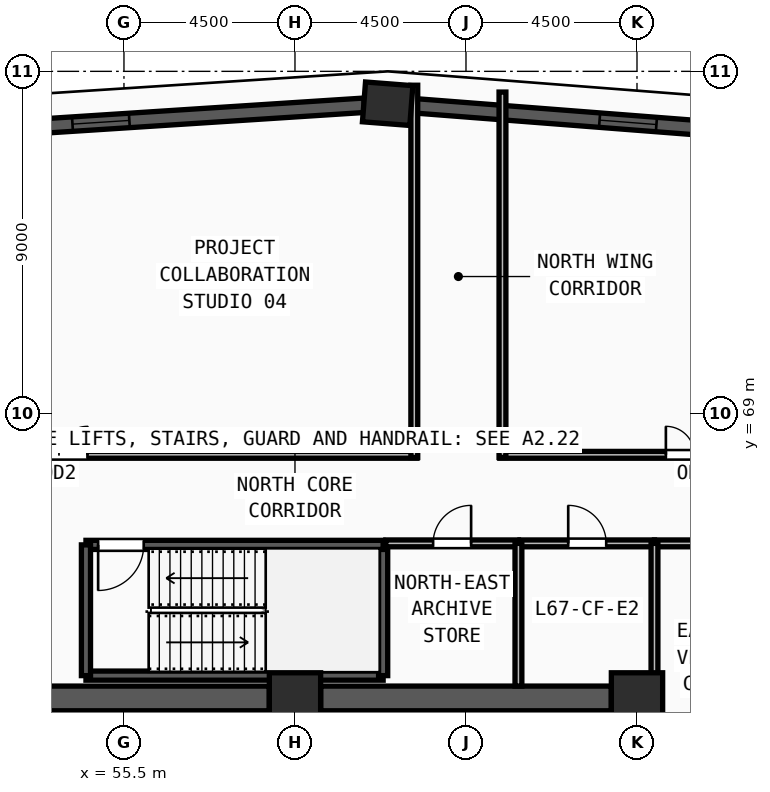
"""IFC4 building model, lengths in metres.
Left out: names, types, materials, properties, quantities, classifications, styles, units other than length and angle.
Written with IfcOpenShell. Run it as: python <this file> out.ifc"""

import sys

from ifc_helpers import new_model, si_unit, direction, frame, frame_2d, origin, origin_2d, place, context, subcontext, project, spatial, rectangle, extrude, source, transform, mapped, element, fill, save


model = new_model("IFC4")
c1 = context("Model", 3, precision=1e-05, world=origin(), true_north=direction((0.0, 1.0)))
c2 = subcontext(c1, "Body", "Model", "MODEL_VIEW")
j1 = project(units=[si_unit("LENGTHUNIT", "METRE"), si_unit("PLANEANGLEUNIT", "RADIAN")], contexts=[c1])
p1 = place(None, origin())
s1 = spatial("IfcSite", under=j1, at=p1, CompositionType="ELEMENT")
p2 = place(p1, origin())
s2 = spatial("IfcBuilding", under=s1, at=p2, CompositionType="ELEMENT")
p3 = place(p2, frame((0.0, 0.0, 258.75)))
s3 = spatial("IfcBuildingStorey", under=s2, at=p3, CompositionType="ELEMENT", Elevation=258.75)
m1 = source(origin(), c2, "Body", "SweptSolid", [
    extrude(rectangle(XDim=1.35, YDim=1.35, at=origin_2d()), origin(), (0.0, 0.0, 1.0), 3.75),
])
for number, where, z_axis, x_axis in (
    (1, (69.0, 61.5, 0.0), (0.0, 0.0, 1.0), (1.0, 0.0, 0.0)),
    (2, (60.0, 61.5, 0.0), (0.0, 0.0, 1.0), (1.0, 0.0, 0.0)),
):
    element("IfcColumn", number, at=place(p3, frame(where, z_axis=z_axis, x_axis=x_axis)), inside=s3, PredefinedType="COLUMN", context=c2, shape_type="MappedRepresentation", body=[
        mapped(m1, transform((0.0, 0.0, 0.0), x_axis=(1.0, 0.0, 0.0), y_axis=(0.0, 1.0, 0.0), z_axis=(0.0, 0.0, 1.0), scale=1.0)),
    ])
m2 = source(origin(), c2, "Body", "SweptSolid", [
    extrude(rectangle(XDim=1.25, YDim=1.05, at=origin_2d()), origin(), (0.0, 0.0, 1.0), 3.75),
])
p4 = place(p3, frame((62.439, 77.148, 0.0), z_axis=(0.0, 0.0, 1.0), x_axis=(-0.997012445566, 0.077241073187, 0.0)))
e3 = element("IfcColumn", 3, at=p4, inside=s3, PredefinedType="COLUMN", context=c2, shape_type="MappedRepresentation", body=[
    mapped(m2, transform((0.0, 0.0, 0.0), x_axis=(1.0, 0.0, 0.0), y_axis=(0.0, 1.0, 0.0), z_axis=(0.0, 0.0, 1.0), scale=1.0)),
])
p5 = place(p3, frame((85.898, 75.331, 0.0), z_axis=(0.0, 0.0, 1.0), x_axis=(-0.997012155609, 0.077244815801, 0.0)))
e4 = element("IfcWall", 4, at=p5, inside=s3, PredefinedType="SOLIDWALL", context=c2, shape_type="SweptSolid", body=[
    extrude(rectangle(XDim=22.914, YDim=0.38, at=frame_2d((11.457, 0.0))), origin(), (0.0, 0.0, 1.0), 3.57),
])
m3 = source(origin(), c2, "Body", "SweptSolid", [
    extrude(rectangle(XDim=1.5, YDim=1.9, at=frame_2d((0.75, 0.95))), frame((0.0, 0.2, 0.0), z_axis=(0.0, -1.0, 0.0), x_axis=(1.0, 0.0, 0.0)), (0.0, 0.0, 1.0), 0.4),
])
p6 = place(p5, frame((4.979, 0.0, 0.55)))
e5 = element("IfcOpeningElement", 5, at=p6, cuts=e4, PredefinedType="OPENING", context=c2, shape_type="MappedRepresentation", body=[
    mapped(m3, transform((0.0, 0.0, 0.0), x_axis=(1.0, 0.0, 0.0), y_axis=(0.0, 1.0, 0.0), z_axis=(0.0, 0.0, 1.0), scale=1.0)),
])
p7 = place(p5, frame((10.707, 0.0, 0.55)))
e6 = element("IfcOpeningElement", 6, at=p7, cuts=e4, PredefinedType="OPENING", context=c2, shape_type="MappedRepresentation", body=[
    mapped(m3, transform((0.0, 0.0, 0.0), x_axis=(1.0, 0.0, 0.0), y_axis=(0.0, 1.0, 0.0), z_axis=(0.0, 0.0, 1.0), scale=1.0)),
])
p8 = place(p5, frame((16.436, 0.0, 0.55)))
e7 = element("IfcOpeningElement", 7, at=p8, cuts=e4, PredefinedType="OPENING", context=c2, shape_type="MappedRepresentation", body=[
    mapped(m3, transform((0.0, 0.0, 0.0), x_axis=(1.0, 0.0, 0.0), y_axis=(0.0, 1.0, 0.0), z_axis=(0.0, 0.0, 1.0), scale=1.0)),
])
p9 = place(p3, frame((61.825, 77.108, 0.0), z_axis=(0.0, 0.0, 1.0), x_axis=(-0.997917689191, -0.064500275963, 0.0)))
e8 = element("IfcWall", 8, at=p9, inside=s3, PredefinedType="SOLIDWALL", context=c2, shape_type="SweptSolid", body=[
    extrude(rectangle(XDim=27.783, YDim=0.38, at=frame_2d((13.891, 0.0))), origin(), (0.0, 0.0, 1.0), 3.57),
])
p10 = place(p9, frame((6.196, 0.0, 0.55)))
e9 = element("IfcOpeningElement", 9, at=p10, cuts=e8, PredefinedType="OPENING", context=c2, shape_type="MappedRepresentation", body=[
    mapped(m3, transform((0.0, 0.0, 0.0), x_axis=(1.0, 0.0, 0.0), y_axis=(0.0, 1.0, 0.0), z_axis=(0.0, 0.0, 1.0), scale=1.0)),
])
p11 = place(p9, frame((13.141, 0.0, 0.55)))
e10 = element("IfcOpeningElement", 10, at=p11, cuts=e8, PredefinedType="OPENING", context=c2, shape_type="MappedRepresentation", body=[
    mapped(m3, transform((0.0, 0.0, 0.0), x_axis=(1.0, 0.0, 0.0), y_axis=(0.0, 1.0, 0.0), z_axis=(0.0, 0.0, 1.0), scale=1.0)),
])
p12 = place(p9, frame((20.087, 0.0, 0.55)))
e11 = element("IfcOpeningElement", 11, at=p12, cuts=e8, PredefinedType="OPENING", context=c2, shape_type="MappedRepresentation", body=[
    mapped(m3, transform((0.0, 0.0, 0.0), x_axis=(1.0, 0.0, 0.0), y_axis=(0.0, 1.0, 0.0), z_axis=(0.0, 0.0, 1.0), scale=1.0)),
])
for number, where, z_axis, x_axis in (
    (12, (51.675, 61.5, 0.0), (0.0, 0.0, 1.0), (1.0, 0.0, 0.0)),
    (13, (60.675, 61.5, 0.0), (0.0, 0.0, 1.0), (1.0, 0.0, 0.0)),
):
    element("IfcWall", number, at=place(p3, frame(where, z_axis=z_axis, x_axis=x_axis)), inside=s3, PredefinedType="SHEAR", context=c2, shape_type="SweptSolid", body=[
        extrude(rectangle(XDim=7.65, YDim=0.65, at=frame_2d((3.825, 0.0))), origin(), (0.0, 0.0, 1.0), 3.57),
    ])
p13 = place(p3, frame((54.5, 62.1, 0.0), z_axis=(0.0, 0.0, 1.0), x_axis=(1.0, 0.0, 0.0)))
e14 = element("IfcWall", 14, at=p13, inside=s3, PredefinedType="SOLIDWALL", context=c2, shape_type="SweptSolid", body=[
    extrude(rectangle(XDim=7.82, YDim=0.24, at=frame_2d((3.91, 0.0))), origin(), (0.0, 0.0, 1.0), 3.57),
])
p14 = place(p3, frame((62.32, 62.1, 0.0), z_axis=(0.0, 0.0, 1.0), x_axis=(0.0, 1.0, 0.0)))
e15 = element("IfcWall", 15, at=p14, inside=s3, PredefinedType="SOLIDWALL", context=c2, shape_type="SweptSolid", body=[
    extrude(rectangle(XDim=3.44, YDim=0.24, at=frame_2d((1.72, 0.0))), origin(), (0.0, 0.0, 1.0), 3.57),
])
p15 = place(p3, frame((62.32, 65.54, 0.0), z_axis=(0.0, 0.0, 1.0), x_axis=(-1.0, 0.0, 0.0)))
e16 = element("IfcWall", 16, at=p15, inside=s3, PredefinedType="SOLIDWALL", context=c2, shape_type="SweptSolid", body=[
    extrude(rectangle(XDim=7.82, YDim=0.24, at=frame_2d((3.91, 0.0))), origin(), (0.0, 0.0, 1.0), 3.57),
])
m4 = source(origin(), c2, "Body", "SweptSolid", [
    extrude(rectangle(XDim=1.2, YDim=2.2, at=frame_2d((0.6, 1.1))), frame((0.0, 0.13, 0.0), z_axis=(0.0, -1.0, 0.0), x_axis=(1.0, 0.0, 0.0)), (0.0, 0.0, 1.0), 0.26),
])
p16 = place(p15, frame((6.3, 0.0, 0.0)))
e17 = element("IfcOpeningElement", 17, at=p16, cuts=e16, PredefinedType="OPENING", context=c2, shape_type="MappedRepresentation", body=[
    mapped(m4, transform((0.0, 0.0, 0.0), x_axis=(1.0, 0.0, 0.0), y_axis=(0.0, 1.0, 0.0), z_axis=(0.0, 0.0, 1.0), scale=1.0)),
])
p17 = place(p3, frame((54.5, 65.54, 0.0), z_axis=(0.0, 0.0, 1.0), x_axis=(0.0, -1.0, 0.0)))
e18 = element("IfcWall", 18, at=p17, inside=s3, PredefinedType="SOLIDWALL", context=c2, shape_type="SweptSolid", body=[
    extrude(rectangle(XDim=3.44, YDim=0.24, at=frame_2d((1.72, 0.0))), origin(), (0.0, 0.0, 1.0), 3.57),
])
p18 = place(p3, frame((62.39, 65.58, 0.0), z_axis=(0.0, 0.0, 1.0), x_axis=(1.0, 0.0, 0.0)))
e19 = element("IfcWall", 19, at=p18, inside=s3, PredefinedType="PARTITIONING", context=c2, shape_type="SweptSolid", body=[
    extrude(rectangle(XDim=3.49, YDim=0.18, at=frame_2d((1.745, 0.0))), origin(), (0.0, 0.0, 1.0), 3.57),
])
m5 = source(origin(), c2, "Body", "SweptSolid", [
    extrude(rectangle(XDim=1.0, YDim=2.2, at=frame_2d((0.5, 1.1))), frame((0.0, 0.1, 0.0), z_axis=(0.0, -1.0, 0.0), x_axis=(1.0, 0.0, 0.0)), (0.0, 0.0, 1.0), 0.2),
])
p19 = place(p18, frame((1.245, 0.0, 0.0)))
e20 = element("IfcOpeningElement", 20, at=p19, cuts=e19, PredefinedType="OPENING", context=c2, shape_type="MappedRepresentation", body=[
    mapped(m5, transform((0.0, 0.0, 0.0), x_axis=(1.0, 0.0, 0.0), y_axis=(0.0, 1.0, 0.0), z_axis=(0.0, 0.0, 1.0), scale=1.0)),
])
p20 = place(p3, frame((65.92, 65.58, 0.0), z_axis=(0.0, 0.0, 1.0), x_axis=(1.0, 0.0, 0.0)))
e21 = element("IfcWall", 21, at=p20, inside=s3, PredefinedType="PARTITIONING", context=c2, shape_type="SweptSolid", body=[
    extrude(rectangle(XDim=3.54, YDim=0.18, at=frame_2d((1.77, 0.0))), origin(), (0.0, 0.0, 1.0), 3.57),
])
p21 = place(p20, frame((1.27, 0.0, 0.0)))
e22 = element("IfcOpeningElement", 22, at=p21, cuts=e21, PredefinedType="OPENING", context=c2, shape_type="MappedRepresentation", body=[
    mapped(m5, transform((0.0, 0.0, 0.0), x_axis=(1.0, 0.0, 0.0), y_axis=(0.0, 1.0, 0.0), z_axis=(0.0, 0.0, 1.0), scale=1.0)),
])
p22 = place(p3, frame((69.46, 65.58, 0.0), z_axis=(0.0, 0.0, 1.0), x_axis=(1.0, 0.0, 0.0)))
e23 = element("IfcWall", 23, at=p22, inside=s3, PredefinedType="PARTITIONING", context=c2, shape_type="SweptSolid", body=[
    extrude(rectangle(XDim=3.84, YDim=0.18, at=frame_2d((1.92, 0.0))), origin(), (0.0, 0.0, 1.0), 3.57),
])
m6 = source(origin(), c2, "Body", "SweptSolid", [
    extrude(rectangle(XDim=1.3, YDim=2.2, at=frame_2d((0.65, 1.1))), frame((0.0, 0.1, 0.0), z_axis=(0.0, -1.0, 0.0), x_axis=(1.0, 0.0, 0.0)), (0.0, 0.0, 1.0), 0.2),
])
p23 = place(p22, frame((1.27, 0.0, 0.0)))
e24 = element("IfcOpeningElement", 24, at=p23, cuts=e23, PredefinedType="OPENING", context=c2, shape_type="MappedRepresentation", body=[
    mapped(m6, transform((0.0, 0.0, 0.0), x_axis=(1.0, 0.0, 0.0), y_axis=(0.0, 1.0, 0.0), z_axis=(0.0, 0.0, 1.0), scale=1.0)),
])
p24 = place(p3, frame((65.39, 67.91, 0.0), z_axis=(0.0, 0.0, 1.0), x_axis=(1.0, 0.0, 0.0)))
e25 = element("IfcWall", 25, at=p24, inside=s3, PredefinedType="PARTITIONING", context=c2, shape_type="SweptSolid", body=[
    extrude(rectangle(XDim=10.24, YDim=0.18, at=frame_2d((5.12, 0.0))), origin(), (0.0, 0.0, 1.0), 3.205),
])
m7 = source(origin(), c2, "Body", "SweptSolid", [
    extrude(rectangle(XDim=1.5, YDim=2.2, at=frame_2d((0.75, 1.1))), frame((0.0, 0.1, 0.0), z_axis=(0.0, -1.0, 0.0), x_axis=(1.0, 0.0, 0.0)), (0.0, 0.0, 1.0), 0.2),
])
p25 = place(p24, frame((4.37, 0.0, 0.0)))
e26 = element("IfcOpeningElement", 26, at=p25, cuts=e25, PredefinedType="OPENING", context=c2, shape_type="MappedRepresentation", body=[
    mapped(m7, transform((0.0, 0.0, 0.0), x_axis=(1.0, 0.0, 0.0), y_axis=(0.0, 1.0, 0.0), z_axis=(0.0, 0.0, 1.0), scale=1.0)),
])
p26 = place(p3, frame((44.37, 67.91, 0.0), z_axis=(0.0, 0.0, 1.0), x_axis=(1.0, 0.0, 0.0)))
e27 = element("IfcWall", 27, at=p26, inside=s3, PredefinedType="PARTITIONING", context=c2, shape_type="SweptSolid", body=[
    extrude(rectangle(XDim=18.84, YDim=0.18, at=frame_2d((9.42, 0.0))), origin(), (0.0, 0.0, 1.0), 3.205),
])
p27 = place(p26, frame((8.67, 0.0, 0.0)))
e28 = element("IfcOpeningElement", 28, at=p27, cuts=e27, PredefinedType="OPENING", context=c2, shape_type="MappedRepresentation", body=[
    mapped(m7, transform((0.0, 0.0, 0.0), x_axis=(1.0, 0.0, 0.0), y_axis=(0.0, 1.0, 0.0), z_axis=(0.0, 0.0, 1.0), scale=1.0)),
])
p28 = place(p3, frame((65.88, 61.825, 0.0), z_axis=(0.0, 0.0, 1.0), x_axis=(0.0, 1.0, 0.0)))
e29 = element("IfcWall", 29, at=p28, inside=s3, PredefinedType="PARTITIONING", context=c2, shape_type="SweptSolid", body=[
    extrude(rectangle(XDim=3.755, YDim=0.18, at=frame_2d((1.877, 0.0))), origin(), (0.0, 0.0, 1.0), 3.57),
])
p29 = place(p3, frame((69.46, 61.95, 0.0), z_axis=(0.0, 0.0, 1.0), x_axis=(0.0, 1.0, 0.0)))
e30 = element("IfcWall", 30, at=p29, inside=s3, PredefinedType="PARTITIONING", context=c2, shape_type="SweptSolid", body=[
    extrude(rectangle(XDim=3.63, YDim=0.18, at=frame_2d((1.815, 0.0))), origin(), (0.0, 0.0, 1.0), 3.57),
])
p30 = place(p3, frame((65.46, 77.455, 0.0), z_axis=(0.0, 0.0, 1.0), x_axis=(0.0, -1.0, 0.0)))
e31 = element("IfcWall", 31, at=p30, inside=s3, PredefinedType="PARTITIONING", context=c2, shape_type="SweptSolid", body=[
    extrude(rectangle(XDim=9.615, YDim=0.18, at=frame_2d((4.808, 0.0))), origin(), (0.0, 0.0, 1.0), 3.57),
])
p31 = place(p3, frame((63.14, 67.84, 0.0), z_axis=(0.0, 0.0, 1.0), x_axis=(0.0, 1.0, 0.0)))
e32 = element("IfcWall", 32, at=p31, inside=s3, PredefinedType="PARTITIONING", context=c2, shape_type="SweptSolid", body=[
    extrude(rectangle(XDim=9.795, YDim=0.18, at=frame_2d((4.897, 0.0))), origin(), (0.0, 0.0, 1.0), 3.57),
])
m8 = source(origin(), c2, "Body", "SweptSolid", [
    extrude(rectangle(XDim=1.5, YDim=1.9, at=frame_2d((0.75, 0.95))), frame((0.0, 0.03, 0.0), z_axis=(0.0, -1.0, 0.0), x_axis=(1.0, 0.0, 0.0)), (0.0, 0.0, 1.0), 0.06),
])
p32 = place(p8, origin())
e33 = element("IfcWindow", 33, at=p32, inside=s3, PartitioningType="DOUBLE_PANEL_VERTICAL", PredefinedType="WINDOW", context=c2, shape_type="MappedRepresentation", body=[
    mapped(m8, transform((0.0, 0.0, 0.0), x_axis=(1.0, 0.0, 0.0), y_axis=(0.0, 1.0, 0.0), z_axis=(0.0, 0.0, 1.0), scale=1.0)),
])
fill(e7, e33)
p33 = place(p10, origin())
e34 = element("IfcWindow", 34, at=p33, inside=s3, PartitioningType="DOUBLE_PANEL_VERTICAL", PredefinedType="WINDOW", context=c2, shape_type="MappedRepresentation", body=[
    mapped(m8, transform((0.0, 0.0, 0.0), x_axis=(1.0, 0.0, 0.0), y_axis=(0.0, 1.0, 0.0), z_axis=(0.0, 0.0, 1.0), scale=1.0)),
])
fill(e9, e34)
m9 = source(origin(), c2, "Body", "SweptSolid", [
    extrude(rectangle(XDim=1.2, YDim=2.2, at=frame_2d((0.6, 1.1))), frame((0.0, 0.025, 0.0), z_axis=(0.0, -1.0, 0.0), x_axis=(1.0, 0.0, 0.0)), (0.0, 0.0, 1.0), 0.05),
])
p34 = place(p16, origin())
e35 = element("IfcDoor", 35, at=p34, inside=s3, OperationType="SINGLE_SWING_RIGHT", PredefinedType="DOOR", context=c2, shape_type="MappedRepresentation", body=[
    mapped(m9, transform((0.0, 0.0, 0.0), x_axis=(1.0, 0.0, 0.0), y_axis=(0.0, 1.0, 0.0), z_axis=(0.0, 0.0, 1.0), scale=1.0)),
])
fill(e17, e35)
m10 = source(origin(), c2, "Body", "SweptSolid", [
    extrude(rectangle(XDim=1.0, YDim=2.2, at=frame_2d((0.5, 1.1))), frame((0.0, 0.025, 0.0), z_axis=(0.0, -1.0, 0.0), x_axis=(1.0, 0.0, 0.0)), (0.0, 0.0, 1.0), 0.05),
])
p35 = place(p19, origin())
e36 = element("IfcDoor", 36, at=p35, inside=s3, OperationType="SINGLE_SWING_RIGHT", PredefinedType="DOOR", context=c2, shape_type="MappedRepresentation", body=[
    mapped(m10, transform((0.0, 0.0, 0.0), x_axis=(1.0, 0.0, 0.0), y_axis=(0.0, 1.0, 0.0), z_axis=(0.0, 0.0, 1.0), scale=1.0)),
])
fill(e20, e36)
p36 = place(p21, origin())
e37 = element("IfcDoor", 37, at=p36, inside=s3, OperationType="SINGLE_SWING_LEFT", PredefinedType="DOOR", context=c2, shape_type="MappedRepresentation", body=[
    mapped(m10, transform((0.0, 0.0, 0.0), x_axis=(1.0, 0.0, 0.0), y_axis=(0.0, 1.0, 0.0), z_axis=(0.0, 0.0, 1.0), scale=1.0)),
])
fill(e22, e37)
m11 = source(origin(), c2, "Body", "SweptSolid", [
    extrude(rectangle(XDim=1.5, YDim=2.2, at=frame_2d((0.75, 1.1))), frame((0.0, 0.025, 0.0), z_axis=(0.0, -1.0, 0.0), x_axis=(1.0, 0.0, 0.0)), (0.0, 0.0, 1.0), 0.05),
])
p37 = place(p25, origin())
e38 = element("IfcDoor", 38, at=p37, inside=s3, OperationType="DOUBLE_DOOR_SINGLE_SWING", PredefinedType="DOOR", context=c2, shape_type="MappedRepresentation", body=[
    mapped(m11, transform((0.0, 0.0, 0.0), x_axis=(1.0, 0.0, 0.0), y_axis=(0.0, 1.0, 0.0), z_axis=(0.0, 0.0, 1.0), scale=1.0)),
])
fill(e26, e38)
p38 = place(p27, origin())
e39 = element("IfcDoor", 39, at=p38, inside=s3, OperationType="DOUBLE_DOOR_SINGLE_SWING", PredefinedType="DOOR", context=c2, shape_type="MappedRepresentation", body=[
    mapped(m11, transform((0.0, 0.0, 0.0), x_axis=(1.0, 0.0, 0.0), y_axis=(0.0, 1.0, 0.0), z_axis=(0.0, 0.0, 1.0), scale=1.0)),
])
fill(e28, e39)
save(model, sys.argv[1])
